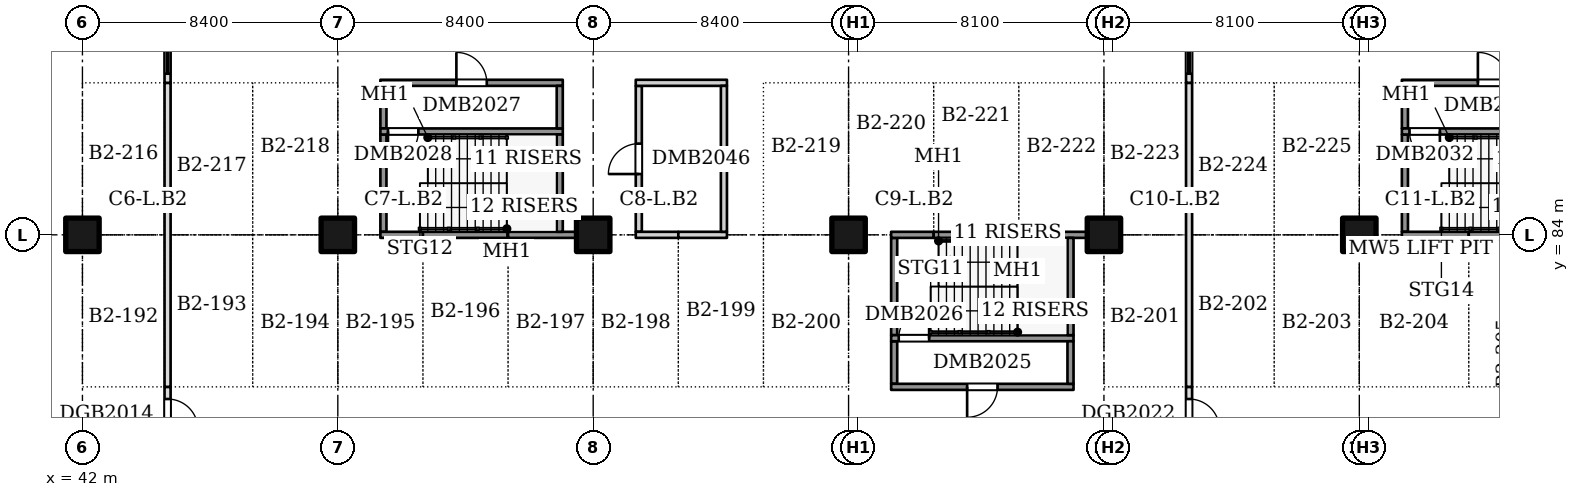
"""IFC4 building model, lengths in metres.
Left out: names, types, materials, properties, quantities, classifications, styles, units other than length and angle.
Written with IfcOpenShell. Run it as: python <this file> out.ifc"""

import sys

from ifc_helpers import new_model, si_unit, direction, frame, frame_2d, origin, origin_2d, place, context, subcontext, project, spatial, rectangle, extrude, element, fill, save


model = new_model("IFC4")
c1 = context("Model", 3, precision=1e-05, world=origin(), true_north=direction((0.0, 1.0)))
c2 = subcontext(c1, "Body", "Model", "MODEL_VIEW")
j1 = project(units=[si_unit("LENGTHUNIT", "METRE"), si_unit("PLANEANGLEUNIT", "RADIAN")], contexts=[c1])
p1 = place(None, origin())
s1 = spatial("IfcSite", under=j1, at=p1, CompositionType="ELEMENT")
p2 = place(p1, origin())
s2 = spatial("IfcBuilding", under=s1, at=p2, CompositionType="ELEMENT")
p3 = place(p2, frame((0.0, 0.0, -8.0)))
s3 = spatial("IfcBuildingStorey", under=s2, at=p3, CompositionType="ELEMENT", Elevation=-8.0)
for number, where, z_axis, x_axis in (
    (1, (42.0, 84.0, 0.0), (0.0, 0.0, 1.0), (1.0, 0.0, 0.0)),
    (2, (50.4, 84.0, 0.0), (0.0, 0.0, 1.0), (1.0, 0.0, 0.0)),
    (3, (58.8, 84.0, 0.0), (0.0, 0.0, 1.0), (1.0, 0.0, 0.0)),
    (4, (67.2, 84.0, 0.0), (0.0, 0.0, 1.0), (1.0, 0.0, 0.0)),
    (5, (75.6, 84.0, 0.0), (0.0, 0.0, 1.0), (1.0, 0.0, 0.0)),
    (6, (84.0, 84.0, 0.0), (0.0, 0.0, 1.0), (1.0, 0.0, 0.0)),
):
    element("IfcColumn", number, at=place(p3, frame(where, z_axis=z_axis, x_axis=x_axis)), inside=s3, PredefinedType="COLUMN", context=c2, shape_type="SweptSolid", body=[
        extrude(rectangle(XDim=1.1, YDim=1.1, at=origin_2d()), origin(), (0.0, 0.0, 1.0), 3.7),
    ])
p4 = place(p3, frame((51.9, 84.1, 0.0), z_axis=(0.0, 0.0, 1.0), x_axis=(0.0, 1.0, 0.0)))
e7 = element("IfcWall", 7, at=p4, inside=s3, PredefinedType="SOLIDWALL", context=c2, shape_type="SweptSolid", body=[
    extrude(rectangle(XDim=3.2, YDim=0.2, at=frame_2d((1.6, 0.0))), origin(), (0.0, 0.0, 1.0), 3.7),
])
for number, where, z_axis, x_axis in (
    (8, (51.8, 84.0, 0.0), (0.0, 0.0, 1.0), (1.0, 0.0, 0.0)),
    (9, (51.9, 87.5, 0.0), (0.0, 0.0, 1.0), (0.0, 1.0, 0.0)),
):
    element("IfcWall", number, at=place(p3, frame(where, z_axis=z_axis, x_axis=x_axis)), inside=s3, PredefinedType="SOLIDWALL", context=c2, shape_type="SweptSolid", body=[
        extrude(rectangle(XDim=1.4, YDim=0.2, at=frame_2d((0.7, 0.0))), origin(), (0.0, 0.0, 1.0), 3.7),
    ])
p5 = place(p3, frame((51.8, 87.4, 0.0), z_axis=(0.0, 0.0, 1.0), x_axis=(1.0, 0.0, 0.0)))
e10 = element("IfcWall", 10, at=p5, inside=s3, PredefinedType="SOLIDWALL", context=c2, shape_type="SweptSolid", body=[
    extrude(rectangle(XDim=6.0, YDim=0.2, at=frame_2d((3.0, 0.0))), origin(), (0.0, 0.0, 1.0), 3.7),
])
p6 = place(p5, frame((0.25, 0.0, 0.0)))
e11 = element("IfcOpeningElement", 11, at=p6, cuts=e10, PredefinedType="OPENING", context=c2, shape_type="SweptSolid", body=[
    extrude(rectangle(XDim=1.0, YDim=2.1, at=frame_2d((0.5, 1.05))), frame((0.0, 0.11, 0.0), z_axis=(0.0, -1.0, 0.0), x_axis=(1.0, 0.0, 0.0)), (0.0, 0.0, 1.0), 0.22),
])
p7 = place(p3, frame((51.8, 89.0, 0.0), z_axis=(0.0, 0.0, 1.0), x_axis=(1.0, 0.0, 0.0)))
e12 = element("IfcWall", 12, at=p7, inside=s3, PredefinedType="SOLIDWALL", context=c2, shape_type="SweptSolid", body=[
    extrude(rectangle(XDim=6.0, YDim=0.2, at=frame_2d((3.0, 0.0))), origin(), (0.0, 0.0, 1.0), 3.7),
])
p8 = place(p7, frame((2.5, 0.0, 0.0)))
e13 = element("IfcOpeningElement", 13, at=p8, cuts=e12, PredefinedType="OPENING", context=c2, shape_type="SweptSolid", body=[
    extrude(rectangle(XDim=1.0, YDim=2.1, at=frame_2d((0.5, 1.05))), frame((0.0, 0.11, 0.0), z_axis=(0.0, -1.0, 0.0), x_axis=(1.0, 0.0, 0.0)), (0.0, 0.0, 1.0), 0.22),
])
p9 = place(p3, frame((53.2, 84.0, 0.0), z_axis=(0.0, 0.0, 1.0), x_axis=(1.0, 0.0, 0.0)))
e14 = element("IfcWall", 14, at=p9, inside=s3, PredefinedType="SOLIDWALL", context=c2, shape_type="SweptSolid", body=[
    extrude(rectangle(XDim=2.8, YDim=0.2, at=frame_2d((1.4, 0.0))), origin(), (0.0, 0.0, 1.0), 3.7),
])
p10 = place(p3, frame((56.0, 84.0, 0.0), z_axis=(0.0, 0.0, 1.0), x_axis=(1.0, 0.0, 0.0)))
e15 = element("IfcWall", 15, at=p10, inside=s3, PredefinedType="SOLIDWALL", context=c2, shape_type="SweptSolid", body=[
    extrude(rectangle(XDim=2.25, YDim=0.2, at=frame_2d((1.125, 0.0))), origin(), (0.0, 0.0, 1.0), 3.7),
])
p11 = place(p3, frame((57.7, 84.1, 0.0), z_axis=(0.0, 0.0, 1.0), x_axis=(0.0, 1.0, 0.0)))
e16 = element("IfcWall", 16, at=p11, inside=s3, PredefinedType="SOLIDWALL", context=c2, shape_type="SweptSolid", body=[
    extrude(rectangle(XDim=3.2, YDim=0.2, at=frame_2d((1.6, 0.0))), origin(), (0.0, 0.0, 1.0), 3.7),
])
p12 = place(p3, frame((57.7, 87.5, 0.0), z_axis=(0.0, 0.0, 1.0), x_axis=(0.0, 1.0, 0.0)))
e17 = element("IfcWall", 17, at=p12, inside=s3, PredefinedType="SOLIDWALL", context=c2, shape_type="SweptSolid", body=[
    extrude(rectangle(XDim=1.4, YDim=0.2, at=frame_2d((0.7, 0.0))), origin(), (0.0, 0.0, 1.0), 3.7),
])
p13 = place(p3, frame((60.3, 84.1, 0.0), z_axis=(0.0, 0.0, 1.0), x_axis=(0.0, 1.0, 0.0)))
e18 = element("IfcWall", 18, at=p13, inside=s3, PredefinedType="PARTITIONING", context=c2, shape_type="SweptSolid", body=[
    extrude(rectangle(XDim=4.8, YDim=0.2, at=frame_2d((2.4, 0.0))), origin(), (0.0, 0.0, 1.0), 3.7),
])
p14 = place(p13, frame((1.9, 0.0, 0.0)))
e19 = element("IfcOpeningElement", 19, at=p14, cuts=e18, PredefinedType="OPENING", context=c2, shape_type="SweptSolid", body=[
    extrude(rectangle(XDim=1.0, YDim=2.1, at=frame_2d((0.5, 1.05))), frame((0.0, 0.11, 0.0), z_axis=(0.0, -1.0, 0.0), x_axis=(1.0, 0.0, 0.0)), (0.0, 0.0, 1.0), 0.22),
])
p15 = place(p3, frame((60.2, 84.0, 0.0), z_axis=(0.0, 0.0, 1.0), x_axis=(1.0, 0.0, 0.0)))
e20 = element("IfcWall", 20, at=p15, inside=s3, PredefinedType="PARTITIONING", context=c2, shape_type="SweptSolid", body=[
    extrude(rectangle(XDim=1.4, YDim=0.2, at=frame_2d((0.7, 0.0))), origin(), (0.0, 0.0, 1.0), 3.7),
])
p16 = place(p3, frame((60.2, 89.0, 0.0), z_axis=(0.0, 0.0, 1.0), x_axis=(1.0, 0.0, 0.0)))
e21 = element("IfcWall", 21, at=p16, inside=s3, PredefinedType="PARTITIONING", context=c2, shape_type="SweptSolid", body=[
    extrude(rectangle(XDim=3.0, YDim=0.2, at=frame_2d((1.5, 0.0))), origin(), (0.0, 0.0, 1.0), 3.7),
])
p17 = place(p3, frame((61.6, 84.0, 0.0), z_axis=(0.0, 0.0, 1.0), x_axis=(1.0, 0.0, 0.0)))
e22 = element("IfcWall", 22, at=p17, inside=s3, PredefinedType="PARTITIONING", context=c2, shape_type="SweptSolid", body=[
    extrude(rectangle(XDim=1.6, YDim=0.2, at=frame_2d((0.8, 0.0))), origin(), (0.0, 0.0, 1.0), 3.7),
])
p18 = place(p3, frame((63.1, 84.1, 0.0), z_axis=(0.0, 0.0, 1.0), x_axis=(0.0, 1.0, 0.0)))
e23 = element("IfcWall", 23, at=p18, inside=s3, PredefinedType="PARTITIONING", context=c2, shape_type="SweptSolid", body=[
    extrude(rectangle(XDim=4.8, YDim=0.2, at=frame_2d((2.4, 0.0))), origin(), (0.0, 0.0, 1.0), 3.7),
])
p19 = place(p3, frame((68.7, 79.1, 0.0), z_axis=(0.0, 0.0, 1.0), x_axis=(0.0, 1.0, 0.0)))
e24 = element("IfcWall", 24, at=p19, inside=s3, PredefinedType="SOLIDWALL", context=c2, shape_type="SweptSolid", body=[
    extrude(rectangle(XDim=1.4, YDim=0.2, at=frame_2d((0.7, 0.0))), origin(), (0.0, 0.0, 1.0), 3.7),
])
p20 = place(p3, frame((68.6, 79.0, 0.0), z_axis=(0.0, 0.0, 1.0), x_axis=(1.0, 0.0, 0.0)))
e25 = element("IfcWall", 25, at=p20, inside=s3, PredefinedType="SOLIDWALL", context=c2, shape_type="SweptSolid", body=[
    extrude(rectangle(XDim=6.0, YDim=0.2, at=frame_2d((3.0, 0.0))), origin(), (0.0, 0.0, 1.0), 3.7),
])
p21 = place(p20, frame((2.5, 0.0, 0.0)))
e26 = element("IfcOpeningElement", 26, at=p21, cuts=e25, PredefinedType="OPENING", context=c2, shape_type="SweptSolid", body=[
    extrude(rectangle(XDim=1.0, YDim=2.1, at=frame_2d((0.5, 1.05))), frame((0.0, 0.11, 0.0), z_axis=(0.0, -1.0, 0.0), x_axis=(1.0, 0.0, 0.0)), (0.0, 0.0, 1.0), 0.22),
])
p22 = place(p3, frame((68.7, 80.7, 0.0), z_axis=(0.0, 0.0, 1.0), x_axis=(0.0, 1.0, 0.0)))
e27 = element("IfcWall", 27, at=p22, inside=s3, PredefinedType="SOLIDWALL", context=c2, shape_type="SweptSolid", body=[
    extrude(rectangle(XDim=3.2, YDim=0.2, at=frame_2d((1.6, 0.0))), origin(), (0.0, 0.0, 1.0), 3.7),
])
p23 = place(p3, frame((68.6, 80.6, 0.0), z_axis=(0.0, 0.0, 1.0), x_axis=(1.0, 0.0, 0.0)))
e28 = element("IfcWall", 28, at=p23, inside=s3, PredefinedType="SOLIDWALL", context=c2, shape_type="SweptSolid", body=[
    extrude(rectangle(XDim=6.0, YDim=0.2, at=frame_2d((3.0, 0.0))), origin(), (0.0, 0.0, 1.0), 3.7),
])
p24 = place(p23, frame((0.25, 0.0, 0.0)))
e29 = element("IfcOpeningElement", 29, at=p24, cuts=e28, PredefinedType="OPENING", context=c2, shape_type="SweptSolid", body=[
    extrude(rectangle(XDim=1.0, YDim=2.1, at=frame_2d((0.5, 1.05))), frame((0.0, 0.11, 0.0), z_axis=(0.0, -1.0, 0.0), x_axis=(1.0, 0.0, 0.0)), (0.0, 0.0, 1.0), 0.22),
])
p25 = place(p3, frame((68.6, 84.0, 0.0), z_axis=(0.0, 0.0, 1.0), x_axis=(1.0, 0.0, 0.0)))
e30 = element("IfcWall", 30, at=p25, inside=s3, PredefinedType="SOLIDWALL", context=c2, shape_type="SweptSolid", body=[
    extrude(rectangle(XDim=1.4, YDim=0.2, at=frame_2d((0.7, 0.0))), origin(), (0.0, 0.0, 1.0), 3.7),
])
p26 = place(p3, frame((70.0, 84.0, 0.0), z_axis=(0.0, 0.0, 1.0), x_axis=(1.0, 0.0, 0.0)))
e31 = element("IfcWall", 31, at=p26, inside=s3, PredefinedType="SOLIDWALL", context=c2, shape_type="SweptSolid", body=[
    extrude(rectangle(XDim=2.8, YDim=0.2, at=frame_2d((1.4, 0.0))), origin(), (0.0, 0.0, 1.0), 3.7),
])
p27 = place(p3, frame((72.8, 84.0, 0.0), z_axis=(0.0, 0.0, 1.0), x_axis=(1.0, 0.0, 0.0)))
e32 = element("IfcWall", 32, at=p27, inside=s3, PredefinedType="SOLIDWALL", context=c2, shape_type="SweptSolid", body=[
    extrude(rectangle(XDim=2.25, YDim=0.2, at=frame_2d((1.125, 0.0))), origin(), (0.0, 0.0, 1.0), 3.7),
])
p28 = place(p3, frame((74.5, 79.1, 0.0), z_axis=(0.0, 0.0, 1.0), x_axis=(0.0, 1.0, 0.0)))
e33 = element("IfcWall", 33, at=p28, inside=s3, PredefinedType="SOLIDWALL", context=c2, shape_type="SweptSolid", body=[
    extrude(rectangle(XDim=1.4, YDim=0.2, at=frame_2d((0.7, 0.0))), origin(), (0.0, 0.0, 1.0), 3.7),
])
for number, where, z_axis, x_axis in (
    (34, (74.5, 80.7, 0.0), (0.0, 0.0, 1.0), (0.0, 1.0, 0.0)),
    (35, (85.5, 84.1, 0.0), (0.0, 0.0, 1.0), (0.0, 1.0, 0.0)),
):
    element("IfcWall", number, at=place(p3, frame(where, z_axis=z_axis, x_axis=x_axis)), inside=s3, PredefinedType="SOLIDWALL", context=c2, shape_type="SweptSolid", body=[
        extrude(rectangle(XDim=3.2, YDim=0.2, at=frame_2d((1.6, 0.0))), origin(), (0.0, 0.0, 1.0), 3.7),
    ])
p29 = place(p3, frame((85.4, 84.0, 0.0), z_axis=(0.0, 0.0, 1.0), x_axis=(1.0, 0.0, 0.0)))
e36 = element("IfcWall", 36, at=p29, inside=s3, PredefinedType="SOLIDWALL", context=c2, shape_type="SweptSolid", body=[
    extrude(rectangle(XDim=2.2, YDim=0.2, at=frame_2d((1.1, 0.0))), origin(), (0.0, 0.0, 1.0), 3.7),
])
p30 = place(p3, frame((85.5, 87.5, 0.0), z_axis=(0.0, 0.0, 1.0), x_axis=(0.0, 1.0, 0.0)))
e37 = element("IfcWall", 37, at=p30, inside=s3, PredefinedType="SOLIDWALL", context=c2, shape_type="SweptSolid", body=[
    extrude(rectangle(XDim=1.4, YDim=0.2, at=frame_2d((0.7, 0.0))), origin(), (0.0, 0.0, 1.0), 3.7),
])
p31 = place(p3, frame((85.4, 87.4, 0.0), z_axis=(0.0, 0.0, 1.0), x_axis=(1.0, 0.0, 0.0)))
e38 = element("IfcWall", 38, at=p31, inside=s3, PredefinedType="SOLIDWALL", context=c2, shape_type="SweptSolid", body=[
    extrude(rectangle(XDim=6.0, YDim=0.2, at=frame_2d((3.0, 0.0))), origin(), (0.0, 0.0, 1.0), 3.7),
])
p32 = place(p31, frame((0.25, 0.0, 0.0)))
e39 = element("IfcOpeningElement", 39, at=p32, cuts=e38, PredefinedType="OPENING", context=c2, shape_type="SweptSolid", body=[
    extrude(rectangle(XDim=1.0, YDim=2.1, at=frame_2d((0.5, 1.05))), frame((0.0, 0.11, 0.0), z_axis=(0.0, -1.0, 0.0), x_axis=(1.0, 0.0, 0.0)), (0.0, 0.0, 1.0), 0.22),
])
p33 = place(p3, frame((85.4, 89.0, 0.0), z_axis=(0.0, 0.0, 1.0), x_axis=(1.0, 0.0, 0.0)))
e40 = element("IfcWall", 40, at=p33, inside=s3, PredefinedType="SOLIDWALL", context=c2, shape_type="SweptSolid", body=[
    extrude(rectangle(XDim=6.0, YDim=0.2, at=frame_2d((3.0, 0.0))), origin(), (0.0, 0.0, 1.0), 3.7),
])
p34 = place(p33, frame((2.5, 0.0, 0.0)))
e41 = element("IfcOpeningElement", 41, at=p34, cuts=e40, PredefinedType="OPENING", context=c2, shape_type="SweptSolid", body=[
    extrude(rectangle(XDim=1.0, YDim=2.1, at=frame_2d((0.5, 1.05))), frame((0.0, 0.11, 0.0), z_axis=(0.0, -1.0, 0.0), x_axis=(1.0, 0.0, 0.0)), (0.0, 0.0, 1.0), 0.22),
])
p35 = place(p3, frame((87.6, 84.0, 0.0), z_axis=(0.0, 0.0, 1.0), x_axis=(1.0, 0.0, 0.0)))
e42 = element("IfcWall", 42, at=p35, inside=s3, PredefinedType="SOLIDWALL", context=c2, shape_type="SweptSolid", body=[
    extrude(rectangle(XDim=2.4, YDim=0.2, at=frame_2d((1.2, 0.0))), origin(), (0.0, 0.0, 1.0), 3.7),
])
p36 = place(p3, frame((44.8, 72.2, 0.0), z_axis=(0.0, 0.0, 1.0), x_axis=(0.0, 1.0, 0.0)))
e43 = element("IfcWall", 43, at=p36, inside=s3, PredefinedType="PARTITIONING", context=c2, shape_type="SweptSolid", body=[
    extrude(rectangle(XDim=6.8, YDim=0.2, at=frame_2d((3.4, 0.0))), origin(), (0.0, 0.0, 1.0), 3.7),
])
p37 = place(p36, frame((0.3, 0.0, 0.0)))
e44 = element("IfcOpeningElement", 44, at=p37, cuts=e43, PredefinedType="OPENING", context=c2, shape_type="SweptSolid", body=[
    extrude(rectangle(XDim=4.8, YDim=2.4, at=frame_2d((2.4, 1.2))), frame((0.0, 0.11, 0.0), z_axis=(0.0, -1.0, 0.0), x_axis=(1.0, 0.0, 0.0)), (0.0, 0.0, 1.0), 0.22),
])
p38 = place(p36, frame((5.4, 0.0, 0.0)))
e45 = element("IfcOpeningElement", 45, at=p38, cuts=e43, PredefinedType="OPENING", context=c2, shape_type="SweptSolid", body=[
    extrude(rectangle(XDim=1.0, YDim=2.1, at=frame_2d((0.5, 1.05))), frame((0.0, 0.11, 0.0), z_axis=(0.0, -1.0, 0.0), x_axis=(1.0, 0.0, 0.0)), (0.0, 0.0, 1.0), 0.22),
])
p39 = place(p3, frame((44.8, 79.0, 0.0), z_axis=(0.0, 0.0, 1.0), x_axis=(0.0, 1.0, 0.0)))
e46 = element("IfcWall", 46, at=p39, inside=s3, PredefinedType="PARTITIONING", context=c2, shape_type="SweptSolid", body=[
    extrude(rectangle(XDim=10.0, YDim=0.2, at=frame_2d((5.0, 0.0))), origin(), (0.0, 0.0, 1.0), 3.7),
])
p40 = place(p3, frame((44.8, 89.0, 0.0), z_axis=(0.0, 0.0, 1.0), x_axis=(0.0, 1.0, 0.0)))
e47 = element("IfcWall", 47, at=p40, inside=s3, PredefinedType="PARTITIONING", context=c2, shape_type="SweptSolid", body=[
    extrude(rectangle(XDim=6.8, YDim=0.2, at=frame_2d((3.4, 0.0))), origin(), (0.0, 0.0, 1.0), 3.7),
])
p41 = place(p40, frame((0.3, 0.0, 0.0)))
e48 = element("IfcOpeningElement", 48, at=p41, cuts=e47, PredefinedType="OPENING", context=c2, shape_type="SweptSolid", body=[
    extrude(rectangle(XDim=4.8, YDim=2.4, at=frame_2d((2.4, 1.2))), frame((0.0, 0.11, 0.0), z_axis=(0.0, -1.0, 0.0), x_axis=(1.0, 0.0, 0.0)), (0.0, 0.0, 1.0), 0.22),
])
p42 = place(p40, frame((5.4, 0.0, 0.0)))
e49 = element("IfcOpeningElement", 49, at=p42, cuts=e47, PredefinedType="OPENING", context=c2, shape_type="SweptSolid", body=[
    extrude(rectangle(XDim=1.0, YDim=2.1, at=frame_2d((0.5, 1.05))), frame((0.0, 0.11, 0.0), z_axis=(0.0, -1.0, 0.0), x_axis=(1.0, 0.0, 0.0)), (0.0, 0.0, 1.0), 0.22),
])
p43 = place(p3, frame((78.4, 72.2, 0.0), z_axis=(0.0, 0.0, 1.0), x_axis=(0.0, 1.0, 0.0)))
e50 = element("IfcWall", 50, at=p43, inside=s3, PredefinedType="PARTITIONING", context=c2, shape_type="SweptSolid", body=[
    extrude(rectangle(XDim=6.8, YDim=0.2, at=frame_2d((3.4, 0.0))), origin(), (0.0, 0.0, 1.0), 3.7),
])
p44 = place(p43, frame((0.3, 0.0, 0.0)))
e51 = element("IfcOpeningElement", 51, at=p44, cuts=e50, PredefinedType="OPENING", context=c2, shape_type="SweptSolid", body=[
    extrude(rectangle(XDim=4.8, YDim=2.4, at=frame_2d((2.4, 1.2))), frame((0.0, 0.11, 0.0), z_axis=(0.0, -1.0, 0.0), x_axis=(1.0, 0.0, 0.0)), (0.0, 0.0, 1.0), 0.22),
])
p45 = place(p43, frame((5.4, 0.0, 0.0)))
e52 = element("IfcOpeningElement", 52, at=p45, cuts=e50, PredefinedType="OPENING", context=c2, shape_type="SweptSolid", body=[
    extrude(rectangle(XDim=1.0, YDim=2.1, at=frame_2d((0.5, 1.05))), frame((0.0, 0.11, 0.0), z_axis=(0.0, -1.0, 0.0), x_axis=(1.0, 0.0, 0.0)), (0.0, 0.0, 1.0), 0.22),
])
p46 = place(p3, frame((78.4, 79.0, 0.0), z_axis=(0.0, 0.0, 1.0), x_axis=(0.0, 1.0, 0.0)))
e53 = element("IfcWall", 53, at=p46, inside=s3, PredefinedType="PARTITIONING", context=c2, shape_type="SweptSolid", body=[
    extrude(rectangle(XDim=10.0, YDim=0.2, at=frame_2d((5.0, 0.0))), origin(), (0.0, 0.0, 1.0), 3.7),
])
p47 = place(p3, frame((78.4, 89.0, 0.0), z_axis=(0.0, 0.0, 1.0), x_axis=(0.0, 1.0, 0.0)))
e54 = element("IfcWall", 54, at=p47, inside=s3, PredefinedType="PARTITIONING", context=c2, shape_type="SweptSolid", body=[
    extrude(rectangle(XDim=6.8, YDim=0.2, at=frame_2d((3.4, 0.0))), origin(), (0.0, 0.0, 1.0), 3.7),
])
p48 = place(p47, frame((0.3, 0.0, 0.0)))
e55 = element("IfcOpeningElement", 55, at=p48, cuts=e54, PredefinedType="OPENING", context=c2, shape_type="SweptSolid", body=[
    extrude(rectangle(XDim=4.8, YDim=2.4, at=frame_2d((2.4, 1.2))), frame((0.0, 0.11, 0.0), z_axis=(0.0, -1.0, 0.0), x_axis=(1.0, 0.0, 0.0)), (0.0, 0.0, 1.0), 0.22),
])
p49 = place(p47, frame((5.4, 0.0, 0.0)))
e56 = element("IfcOpeningElement", 56, at=p49, cuts=e54, PredefinedType="OPENING", context=c2, shape_type="SweptSolid", body=[
    extrude(rectangle(XDim=1.0, YDim=2.1, at=frame_2d((0.5, 1.05))), frame((0.0, 0.11, 0.0), z_axis=(0.0, -1.0, 0.0), x_axis=(1.0, 0.0, 0.0)), (0.0, 0.0, 1.0), 0.22),
])
p50 = place(p21, frame((1.0, 0.0, 0.0), z_axis=(0.0, 0.0, 1.0), x_axis=(-1.0, 0.0, 0.0)))
e57 = element("IfcDoor", 57, at=p50, inside=s3, OperationType="SINGLE_SWING_RIGHT", PredefinedType="DOOR", context=c2, shape_type="SweptSolid", body=[
    extrude(rectangle(XDim=1.0, YDim=2.1, at=frame_2d((0.5, 1.05))), frame((0.0, 0.025, 0.0), z_axis=(0.0, -1.0, 0.0), x_axis=(1.0, 0.0, 0.0)), (0.0, 0.0, 1.0), 0.05),
])
fill(e26, e57)
p51 = place(p24, origin())
e58 = element("IfcDoor", 58, at=p51, inside=s3, OperationType="SINGLE_SWING_RIGHT", PredefinedType="DOOR", context=c2, shape_type="SweptSolid", body=[
    extrude(rectangle(XDim=1.0, YDim=2.1, at=frame_2d((0.5, 1.05))), frame((0.0, 0.025, 0.0), z_axis=(0.0, -1.0, 0.0), x_axis=(1.0, 0.0, 0.0)), (0.0, 0.0, 1.0), 0.05),
])
fill(e29, e58)
p52 = place(p8, origin())
e59 = element("IfcDoor", 59, at=p52, inside=s3, OperationType="SINGLE_SWING_LEFT", PredefinedType="DOOR", context=c2, shape_type="SweptSolid", body=[
    extrude(rectangle(XDim=1.0, YDim=2.1, at=frame_2d((0.5, 1.05))), frame((0.0, 0.025, 0.0), z_axis=(0.0, -1.0, 0.0), x_axis=(1.0, 0.0, 0.0)), (0.0, 0.0, 1.0), 0.05),
])
fill(e13, e59)
p53 = place(p6, frame((1.0, 0.0, 0.0), z_axis=(0.0, 0.0, 1.0), x_axis=(-1.0, 0.0, 0.0)))
e60 = element("IfcDoor", 60, at=p53, inside=s3, OperationType="SINGLE_SWING_RIGHT", PredefinedType="DOOR", context=c2, shape_type="SweptSolid", body=[
    extrude(rectangle(XDim=1.0, YDim=2.1, at=frame_2d((0.5, 1.05))), frame((0.0, 0.025, 0.0), z_axis=(0.0, -1.0, 0.0), x_axis=(1.0, 0.0, 0.0)), (0.0, 0.0, 1.0), 0.05),
])
fill(e11, e60)
p54 = place(p34, origin())
e61 = element("IfcDoor", 61, at=p54, inside=s3, OperationType="SINGLE_SWING_LEFT", PredefinedType="DOOR", context=c2, shape_type="SweptSolid", body=[
    extrude(rectangle(XDim=1.0, YDim=2.1, at=frame_2d((0.5, 1.05))), frame((0.0, 0.025, 0.0), z_axis=(0.0, -1.0, 0.0), x_axis=(1.0, 0.0, 0.0)), (0.0, 0.0, 1.0), 0.05),
])
fill(e41, e61)
p55 = place(p32, frame((1.0, 0.0, 0.0), z_axis=(0.0, 0.0, 1.0), x_axis=(-1.0, 0.0, 0.0)))
e62 = element("IfcDoor", 62, at=p55, inside=s3, OperationType="SINGLE_SWING_LEFT", PredefinedType="DOOR", context=c2, shape_type="SweptSolid", body=[
    extrude(rectangle(XDim=1.0, YDim=2.1, at=frame_2d((0.5, 1.05))), frame((0.0, 0.025, 0.0), z_axis=(0.0, -1.0, 0.0), x_axis=(1.0, 0.0, 0.0)), (0.0, 0.0, 1.0), 0.05),
])
fill(e39, e62)
p56 = place(p14, origin())
e63 = element("IfcDoor", 63, at=p56, inside=s3, OperationType="SINGLE_SWING_LEFT", PredefinedType="DOOR", context=c2, shape_type="SweptSolid", body=[
    extrude(rectangle(XDim=1.0, YDim=2.1, at=frame_2d((0.5, 1.05))), frame((0.0, 0.025, 0.0), z_axis=(0.0, -1.0, 0.0), x_axis=(1.0, 0.0, 0.0)), (0.0, 0.0, 1.0), 0.05),
])
fill(e19, e63)
p57 = place(p38, frame((1.0, 0.0, 0.0), z_axis=(0.0, 0.0, 1.0), x_axis=(-1.0, 0.0, 0.0)))
e64 = element("IfcDoor", 64, at=p57, inside=s3, OperationType="SINGLE_SWING_RIGHT", PredefinedType="DOOR", context=c2, shape_type="SweptSolid", body=[
    extrude(rectangle(XDim=1.0, YDim=2.1, at=frame_2d((0.5, 1.05))), frame((0.0, 0.025, 0.0), z_axis=(0.0, -1.0, 0.0), x_axis=(1.0, 0.0, 0.0)), (0.0, 0.0, 1.0), 0.05),
])
fill(e45, e64)
p58 = place(p41, origin())
e65 = element("IfcDoor", 65, at=p58, inside=s3, OperationType="ROLLINGUP", PredefinedType="GATE", context=c2, shape_type="SweptSolid", body=[
    extrude(rectangle(XDim=4.8, YDim=2.4, at=frame_2d((2.4, 1.2))), frame((0.0, 0.025, 0.0), z_axis=(0.0, -1.0, 0.0), x_axis=(1.0, 0.0, 0.0)), (0.0, 0.0, 1.0), 0.05),
])
fill(e48, e65)
p59 = place(p45, frame((1.0, 0.0, 0.0), z_axis=(0.0, 0.0, 1.0), x_axis=(-1.0, 0.0, 0.0)))
e66 = element("IfcDoor", 66, at=p59, inside=s3, OperationType="SINGLE_SWING_RIGHT", PredefinedType="DOOR", context=c2, shape_type="SweptSolid", body=[
    extrude(rectangle(XDim=1.0, YDim=2.1, at=frame_2d((0.5, 1.05))), frame((0.0, 0.025, 0.0), z_axis=(0.0, -1.0, 0.0), x_axis=(1.0, 0.0, 0.0)), (0.0, 0.0, 1.0), 0.05),
])
fill(e52, e66)
p60 = place(p48, origin())
e67 = element("IfcDoor", 67, at=p60, inside=s3, OperationType="ROLLINGUP", PredefinedType="GATE", context=c2, shape_type="SweptSolid", body=[
    extrude(rectangle(XDim=4.8, YDim=2.4, at=frame_2d((2.4, 1.2))), frame((0.0, 0.025, 0.0), z_axis=(0.0, -1.0, 0.0), x_axis=(1.0, 0.0, 0.0)), (0.0, 0.0, 1.0), 0.05),
])
fill(e55, e67)
save(model, sys.argv[1])
